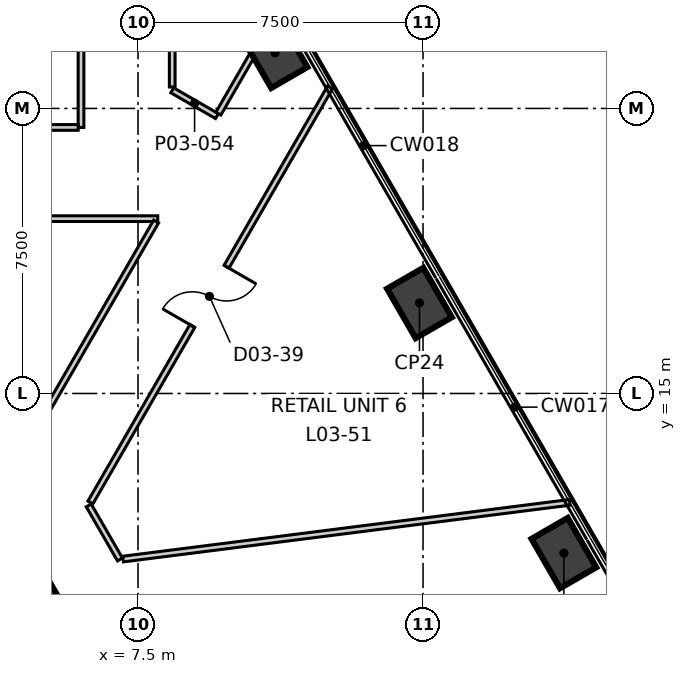
"""IFC4 building model, lengths in metres.
Left out: names, types, materials, properties, quantities, classifications, styles, units other than length and angle.
Written with IfcOpenShell. Run it as: python <this file> out.ifc"""

import sys

from ifc_helpers import new_model, si_unit, direction, frame, frame_2d, origin, origin_2d, place, context, subcontext, project, spatial, polyline, rectangle, outline, extrude, element, fill, save


model = new_model("IFC4")
c1 = context("Model", 3, precision=1e-05, world=origin(), true_north=direction((0.0, 1.0)))
c2 = subcontext(c1, "Body", "Model", "MODEL_VIEW")
j1 = project(units=[si_unit("LENGTHUNIT", "METRE"), si_unit("PLANEANGLEUNIT", "RADIAN")], contexts=[c1])
p1 = place(None, origin())
s1 = spatial("IfcSite", under=j1, at=p1, CompositionType="ELEMENT")
p2 = place(p1, origin())
s2 = spatial("IfcBuilding", under=s1, at=p2, CompositionType="ELEMENT")
p3 = place(p2, frame((0.0, 0.0, 19.9)))
s3 = spatial("IfcBuildingStorey", under=s2, at=p3, CompositionType="ELEMENT", Elevation=19.9)
p4 = place(p3, frame((13.972, -6.2, -0.4), z_axis=(0.0, 0.0, 1.0), x_axis=(-0.499992141631, 0.866029940768, 0.0)))
e1 = element("IfcWall", 1, at=p4, inside=s3, PredefinedType="SHEAR", context=c2, shape_type="SweptSolid", body=[
    extrude(outline(polyline([(-0.288, -0.5), (1.657, -0.5), (3.602, -0.5), (5.547, -0.5), (7.493, -0.5), (9.438, -0.5), (11.383, -0.5), (13.328, -0.5), (15.273, -0.5), (17.218, -0.499), (19.164, -0.499), (21.109, -0.499), (23.054, -0.499), (24.999, -0.499), (24.422, 0.5), (22.566, 0.5), (20.709, 0.5), (18.853, 0.5), (16.996, 0.5), (15.14, 0.5), (13.283, 0.5), (11.427, 0.5), (9.57, 0.5), (7.714, 0.5), (5.857, 0.5), (4.001, 0.5), (2.145, 0.5), (0.288, 0.5), (-0.288, -0.5)])), origin(), (0.0, 0.0, 1.0), 5.4),
])
p5 = place(p4, frame((11.455, 0.0, 0.4)))
e2 = element("IfcOpeningElement", 2, at=p5, cuts=e1, PredefinedType="OPENING", context=c2, shape_type="SweptSolid", body=[
    extrude(rectangle(XDim=1.8, YDim=2.1, at=frame_2d((0.9, 1.05))), frame((0.0, 0.51, 0.0), z_axis=(0.0, -1.0, 0.0), x_axis=(1.0, 0.0, 0.0)), (0.0, 0.0, 1.0), 1.02),
])
for number, where, z_axis, x_axis in (
    (3, (18.706, 10.8, -0.4), (0.0, 0.0, 1.0), (-0.5, 0.866, 0.0)),
    (4, (14.906, 17.381, -0.4), (0.0, 0.0, 1.0), (-0.5, 0.866, 0.0)),
    (5, (11.106, 23.962, -0.4), (0.0, 0.0, 1.0), (-0.5, 0.866, 0.0)),
):
    element("IfcColumn", number, at=place(p3, frame(where, z_axis=z_axis, x_axis=x_axis)), inside=s3, PredefinedType="COLUMN", context=c2, shape_type="SweptSolid", body=[
        extrude(rectangle(XDim=1.5, YDim=1.1, at=origin_2d()), origin(), (0.0, 0.0, 1.0), 5.4),
    ])
p6 = place(p3, frame((8.4, 22.977, 0.0), z_axis=(0.0, 0.0, 1.0), x_axis=(0.866212506108, -0.499675789149, 0.0)))
e6 = element("IfcWall", 6, at=p6, inside=s3, PredefinedType="PARTITIONING", context=c2, shape_type="SweptSolid", body=[
    extrude(rectangle(XDim=1.359, YDim=0.15, at=frame_2d((0.679, 0.0))), origin(), (0.0, 0.0, 1.0), 5.0),
])
p7 = place(p3, frame((-7.325, 19.6, 0.0), z_axis=(0.0, 0.0, 1.0), x_axis=(1.0, 0.0, 0.0)))
e7 = element("IfcWall", 7, at=p7, inside=s3, PredefinedType="PARTITIONING", context=c2, shape_type="SweptSolid", body=[
    extrude(rectangle(XDim=15.344, YDim=0.15, at=frame_2d((7.672, 0.0))), origin(), (0.0, 0.0, 1.0), 5.0),
])
p8 = place(p7, frame((7.135, 0.0, 0.0)))
e8 = element("IfcOpeningElement", 8, at=p8, cuts=e7, PredefinedType="OPENING", context=c2, shape_type="SweptSolid", body=[
    extrude(rectangle(XDim=1.0, YDim=2.1, at=frame_2d((0.5, 1.05))), frame((0.0, 0.085, 0.0), z_axis=(0.0, -1.0, 0.0), x_axis=(1.0, 0.0, 0.0)), (0.0, 0.0, 1.0), 0.17),
])
p9 = place(p3, frame((4.933, 14.255, 0.0), z_axis=(0.0, 0.0, 1.0), x_axis=(0.500039629421, 0.866002522519, 0.0)))
e9 = element("IfcWall", 9, at=p9, inside=s3, PredefinedType="PARTITIONING", context=c2, shape_type="SweptSolid", body=[
    extrude(rectangle(XDim=6.085, YDim=0.15, at=frame_2d((3.043, 0.0))), origin(), (0.0, 0.0, 1.0), 5.0),
])
p10 = place(p3, frame((9.614, 22.363, 0.0), z_axis=(0.0, 0.0, 1.0), x_axis=(0.500070516041, 0.865984687501, 0.0)))
e10 = element("IfcWall", 10, at=p10, inside=s3, PredefinedType="PARTITIONING", context=c2, shape_type="SweptSolid", body=[
    extrude(rectangle(XDim=3.339, YDim=0.15, at=frame_2d((1.67, 0.0))), origin(), (0.0, 0.0, 1.0), 4.4),
])
p11 = place(p3, frame((6.203, 12.055, 0.0), z_axis=(0.0, 0.0, 1.0), x_axis=(0.500245418622, -0.865883664904, 0.0)))
e11 = element("IfcWall", 11, at=p11, inside=s3, PredefinedType="PARTITIONING", context=c2, shape_type="SweptSolid", body=[
    extrude(rectangle(XDim=1.643, YDim=0.15, at=frame_2d((0.822, 0.0))), origin(), (0.0, 0.0, 1.0), 5.0),
])
p12 = place(p3, frame((8.4, 23.064, 0.0), z_axis=(0.0, 0.0, 1.0), x_axis=(0.0, 1.0, 0.0)))
e12 = element("IfcWall", 12, at=p12, inside=s3, PredefinedType="PARTITIONING", context=c2, shape_type="SweptSolid", body=[
    extrude(rectangle(XDim=2.786, YDim=0.15, at=frame_2d((1.393, 0.0))), origin(), (0.0, 0.0, 1.0), 5.0),
])
p13 = place(p3, frame((6.0, 22.0, 0.0), z_axis=(0.0, 0.0, 1.0), x_axis=(0.0, 1.0, 0.0)))
e13 = element("IfcWall", 13, at=p13, inside=s3, PredefinedType="PARTITIONING", context=c2, shape_type="SweptSolid", body=[
    extrude(rectangle(XDim=3.057, YDim=0.15, at=frame_2d((1.528, 0.0))), origin(), (0.0, 0.0, 1.0), 4.25),
])
p14 = place(p3, frame((-5.0, 22.0, 0.0), z_axis=(0.0, 0.0, 1.0), x_axis=(1.0, 0.0, 0.0)))
e14 = element("IfcWall", 14, at=p14, inside=s3, PredefinedType="PARTITIONING", context=c2, shape_type="SweptSolid", body=[
    extrude(rectangle(XDim=10.925, YDim=0.15, at=frame_2d((5.462, 0.0))), origin(), (0.0, 0.0, 1.0), 5.0),
])
p15 = place(p14, frame((2.0, 0.0, 0.0)))
e15 = element("IfcOpeningElement", 15, at=p15, cuts=e14, PredefinedType="OPENING", context=c2, shape_type="SweptSolid", body=[
    extrude(rectangle(XDim=1.0, YDim=2.1, at=frame_2d((0.5, 1.05))), frame((0.0, 0.085, 0.0), z_axis=(0.0, -1.0, 0.0), x_axis=(1.0, 0.0, 0.0)), (0.0, 0.0, 1.0), 0.17),
])
p16 = place(p14, frame((7.5, 0.0, 0.0)))
e16 = element("IfcOpeningElement", 16, at=p16, cuts=e14, PredefinedType="OPENING", context=c2, shape_type="SweptSolid", body=[
    extrude(rectangle(XDim=1.0, YDim=2.1, at=frame_2d((0.5, 1.05))), frame((0.0, 0.085, 0.0), z_axis=(0.0, -1.0, 0.0), x_axis=(1.0, 0.0, 0.0)), (0.0, 0.0, 1.0), 0.17),
])
p17 = place(p3, frame((7.106, 10.643, 0.0), z_axis=(0.0, 0.0, 1.0), x_axis=(0.992038919821, 0.125931654321, 0.0)))
e17 = element("IfcWall", 17, at=p17, inside=s3, PredefinedType="PARTITIONING", context=c2, shape_type="SweptSolid", body=[
    extrude(rectangle(XDim=11.847, YDim=0.15, at=frame_2d((5.924, 0.0))), origin(), (0.0, 0.0, 1.0), 5.0),
])
p18 = place(p3, frame((6.247, 12.13, 0.0), z_axis=(0.0, 0.0, 1.0), x_axis=(0.49995867205, 0.866049263173, 0.0)))
e18 = element("IfcWall", 18, at=p18, inside=s3, PredefinedType="PARTITIONING", context=c2, shape_type="SweptSolid", body=[
    extrude(rectangle(XDim=12.615, YDim=0.15, at=frame_2d((6.307, 0.0))), origin(), (0.0, 0.0, 1.0), 5.0),
])
p19 = place(p18, frame((5.364, 0.0, 0.0)))
e19 = element("IfcOpeningElement", 19, at=p19, cuts=e18, PredefinedType="OPENING", context=c2, shape_type="SweptSolid", body=[
    extrude(rectangle(XDim=1.8, YDim=2.1, at=frame_2d((0.9, 1.05))), frame((0.0, 0.085, 0.0), z_axis=(0.0, -1.0, 0.0), x_axis=(1.0, 0.0, 0.0)), (0.0, 0.0, 1.0), 0.17),
])
p20 = place(p19, origin())
e20 = element("IfcDoor", 20, at=p20, inside=s3, OperationType="DOUBLE_DOOR_SINGLE_SWING", PredefinedType="DOOR", context=c2, shape_type="SweptSolid", body=[
    extrude(rectangle(XDim=1.8, YDim=2.1, at=frame_2d((0.9, 1.05))), frame((0.0, 0.025, 0.0), z_axis=(0.0, -1.0, 0.0), x_axis=(1.0, 0.0, 0.0)), (0.0, 0.0, 1.0), 0.05),
])
fill(e19, e20)
save(model, sys.argv[1])
